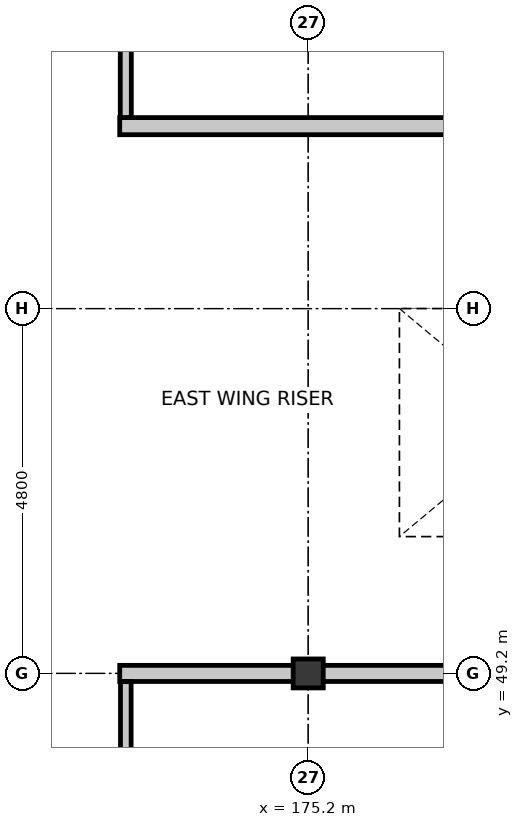
"""IFC4 building model, lengths in metres.
Left out: names, types, materials, properties, quantities, classifications, styles, units other than length and angle.
Written with IfcOpenShell. Run it as: python <this file> out.ifc"""

import sys

from ifc_helpers import new_model, si_unit, direction, frame, frame_2d, origin, origin_2d, place, context, subcontext, project, spatial, rectangle, i_section, extrude, element, save


model = new_model("IFC4")
c1 = context("Model", 3, precision=1e-05, world=origin(), true_north=direction((0.0, 1.0)))
c2 = subcontext(c1, "Body", "Model", "MODEL_VIEW")
j1 = project(units=[si_unit("LENGTHUNIT", "METRE"), si_unit("PLANEANGLEUNIT", "RADIAN")], contexts=[c1])
p1 = place(None, origin())
s1 = spatial("IfcSite", under=j1, at=p1, CompositionType="ELEMENT")
p2 = place(p1, origin())
s2 = spatial("IfcBuilding", under=s1, at=p2, CompositionType="ELEMENT")
p3 = place(p2, origin())
s3 = spatial("IfcBuildingStorey", under=s2, at=p3, CompositionType="ELEMENT", Elevation=0.0)
p4 = place(p3, frame((175.2, 49.2, 0.0), z_axis=(0.0, 0.0, 1.0), x_axis=(1.0, 0.0, 0.0)))
e1 = element("IfcColumn", 1, at=p4, inside=s3, PredefinedType="COLUMN", context=c2, shape_type="SweptSolid", body=[
    extrude(i_section(OverallWidth=0.396, OverallDepth=0.381, WebThickness=0.019, FlangeThickness=0.03, FilletRadius=0.015, at=origin_2d()), origin(), (0.0, 0.0, 1.0), 5.4),
])
p5 = place(p3, frame((172.72, 49.2, 0.0), z_axis=(0.0, 0.0, 1.0), x_axis=(1.0, 0.0, 0.0)))
e2 = element("IfcWall", 2, at=p5, inside=s3, PredefinedType="PARTITIONING", context=c2, shape_type="SweptSolid", body=[
    extrude(rectangle(XDim=31.148, YDim=0.212, at=frame_2d((15.574, 0.0))), origin(), (0.0, 0.0, 1.0), 4.437),
])
p6 = place(p3, frame((203.868, 56.4, 0.0), z_axis=(0.0, 0.0, 1.0), x_axis=(-1.0, 0.0, 0.0)))
e3 = element("IfcWall", 3, at=p6, inside=s3, PredefinedType="PARTITIONING", context=c2, shape_type="SweptSolid", body=[
    extrude(rectangle(XDim=31.148, YDim=0.225, at=frame_2d((15.574, 0.0))), origin(), (0.0, 0.0, 1.0), 4.437),
])
p7 = place(p3, frame((172.8, 27.705, 0.0), z_axis=(0.0, 0.0, 1.0), x_axis=(0.0, 1.0, 0.0)))
e4 = element("IfcWall", 4, at=p7, inside=s3, PredefinedType="PARTITIONING", context=c2, shape_type="SweptSolid", body=[
    extrude(rectangle(XDim=21.387, YDim=0.14, at=frame_2d((10.693, 0.0))), origin(), (0.0, 0.0, 1.0), 4.437),
])
p8 = place(p7, frame((10.134, 0.0, 0.0)))
e5 = element("IfcOpeningElement", 5, at=p8, cuts=e4, PredefinedType="OPENING", context=c2, shape_type="SweptSolid", body=[
    extrude(rectangle(XDim=1.12, YDim=2.22, at=frame_2d((0.56, 1.11))), frame((0.0, 0.08, 0.0), z_axis=(0.0, -1.0, 0.0), x_axis=(1.0, 0.0, 0.0)), (0.0, 0.0, 1.0), 0.16),
])
p9 = place(p3, frame((172.8, 56.514, 0.0), z_axis=(0.0, 0.0, 1.0), x_axis=(0.0, 1.0, 0.0)))
e6 = element("IfcWall", 6, at=p9, inside=s3, PredefinedType="PARTITIONING", context=c2, shape_type="SweptSolid", body=[
    extrude(rectangle(XDim=29.766, YDim=0.145, at=frame_2d((14.883, 0.0))), origin(), (0.0, 0.0, 1.0), 4.437),
])
p10 = place(p9, frame((14.253, 0.0, 0.0)))
e7 = element("IfcOpeningElement", 7, at=p10, cuts=e6, PredefinedType="OPENING", context=c2, shape_type="SweptSolid", body=[
    extrude(rectangle(XDim=1.26, YDim=2.22, at=frame_2d((0.63, 1.11))), frame((0.0, 0.083, 0.0), z_axis=(0.0, -1.0, 0.0), x_axis=(1.0, 0.0, 0.0)), (0.0, 0.0, 1.0), 0.165),
])
p11 = place(p9, frame((16.763, 0.0, 0.95)))
e8 = element("IfcOpeningElement", 8, at=p11, cuts=e6, PredefinedType="OPENING", context=c2, shape_type="SweptSolid", body=[
    extrude(rectangle(XDim=1.1, YDim=1.3, at=frame_2d((0.55, 0.65))), frame((0.0, 0.083, 0.0), z_axis=(0.0, -1.0, 0.0), x_axis=(1.0, 0.0, 0.0)), (0.0, 0.0, 1.0), 0.165),
])
save(model, sys.argv[1])
